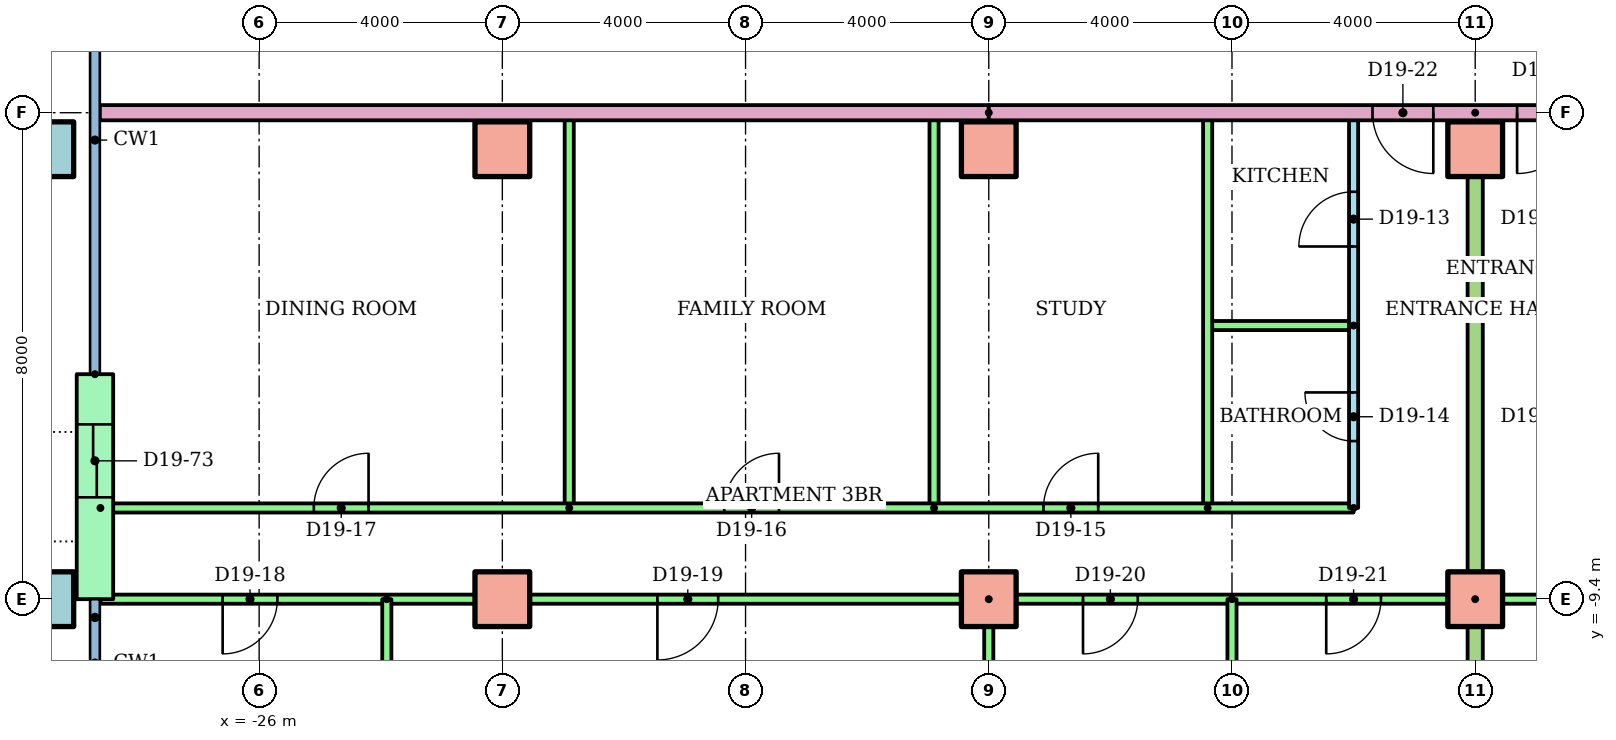
"""IFC4 building model, lengths in metres.
Left out: names, types, materials, properties, quantities, classifications, styles, units other than length and angle.
Written with IfcOpenShell. Run it as: python <this file> out.ifc"""

import sys

from ifc_helpers import new_model, si_unit, direction, frame, frame_2d, origin, origin_2d, place, context, subcontext, project, spatial, rectangle, hollow_rectangle, extrude, element, fill, save


model = new_model("IFC4")
c1 = context("Model", 3, precision=1e-05, world=origin(), true_north=direction((0.0, 1.0)))
c2 = subcontext(c1, "Body", "Model", "MODEL_VIEW")
j1 = project(units=[si_unit("LENGTHUNIT", "METRE"), si_unit("PLANEANGLEUNIT", "RADIAN")], contexts=[c1])
p1 = place(None, origin())
s1 = spatial("IfcSite", under=j1, at=p1, CompositionType="ELEMENT")
p2 = place(p1, origin())
s2 = spatial("IfcBuilding", under=s1, at=p2, CompositionType="ELEMENT")
p3 = place(p2, frame((0.0, 0.0, 77.5)))
s3 = spatial("IfcBuildingStorey", under=s2, at=p3, CompositionType="ELEMENT", Elevation=77.5)
p4 = place(p3, frame((-29.5, -9.4, 0.0)))
e1 = element("IfcColumn", 1, at=p4, inside=s3, PredefinedType="COLUMN", context=c2, shape_type="SweptSolid", body=[
    extrude(hollow_rectangle(XDim=0.9, YDim=0.9, WallThickness=0.045, at=origin_2d()), origin(), (0.0, 0.0, 1.0), 3.2),
])
for number, where in (
    (2, (-22.0, -9.4, 0.0)),
    (3, (-14.0, -9.4, 0.0)),
    (4, (-6.0, -9.4, 0.0)),
):
    element("IfcColumn", number, at=place(p3, frame(where)), inside=s3, PredefinedType="COLUMN", context=c2, shape_type="SweptSolid", body=[
        extrude(rectangle(XDim=0.9, YDim=0.9, at=origin_2d()), origin(), (0.0, 0.0, 1.0), 3.2),
    ])
p5 = place(p3, frame((-29.5, -2.0, 0.0)))
e5 = element("IfcColumn", 5, at=p5, inside=s3, PredefinedType="COLUMN", context=c2, shape_type="SweptSolid", body=[
    extrude(hollow_rectangle(XDim=0.9, YDim=0.9, WallThickness=0.045, at=origin_2d()), origin(), (0.0, 0.0, 1.0), 3.2),
])
for number, where in (
    (6, (-22.0, -2.0, 0.0)),
    (7, (-14.0, -2.0, 0.0)),
    (8, (-6.0, -2.0, 0.0)),
):
    element("IfcColumn", number, at=place(p3, frame(where)), inside=s3, PredefinedType="COLUMN", context=c2, shape_type="SweptSolid", body=[
        extrude(rectangle(XDim=0.9, YDim=0.9, at=origin_2d()), origin(), (0.0, 0.0, 1.0), 3.2),
    ])
p6 = place(p3, frame((-28.7, -5.7, 0.0), z_axis=(0.0, 0.0, 1.0), x_axis=(0.0, -1.0, 0.0)))
e9 = element("IfcWall", 9, at=p6, inside=s3, PredefinedType="STANDARD", context=c2, shape_type="SweptSolid", body=[
    extrude(rectangle(XDim=3.7, YDim=0.6, at=frame_2d((1.85, 0.0))), origin(), (0.0, 0.0, 1.0), 2.92),
])
p7 = place(p6, frame((0.825, 0.0, 0.0)))
e10 = element("IfcOpeningElement", 10, at=p7, cuts=e9, PredefinedType="OPENING", context=c2, shape_type="SweptSolid", body=[
    extrude(rectangle(XDim=1.2, YDim=2.1, at=frame_2d((0.6, 1.05))), frame((0.0, 0.31, 0.0), z_axis=(0.0, -1.0, 0.0), x_axis=(1.0, 0.0, 0.0)), (0.0, 0.0, 1.0), 0.62),
])
p8 = place(p3, frame((-8.0, -7.9, 0.0), z_axis=(0.0, 0.0, 1.0), x_axis=(0.0, 1.0, 0.0)))
e11 = element("IfcWall", 11, at=p8, inside=s3, PredefinedType="PARTITIONING", context=c2, shape_type="SweptSolid", body=[
    extrude(rectangle(XDim=6.5, YDim=0.15, at=frame_2d((3.25, 0.0))), origin(), (0.0, 0.0, 1.0), 2.4),
])
p9 = place(p8, frame((4.3, 0.0, 0.0)))
e12 = element("IfcOpeningElement", 12, at=p9, cuts=e11, PredefinedType="OPENING", context=c2, shape_type="SweptSolid", body=[
    extrude(rectangle(XDim=0.9, YDim=2.1, at=frame_2d((0.45, 1.05))), frame((0.0, 0.085, 0.0), z_axis=(0.0, -1.0, 0.0), x_axis=(1.0, 0.0, 0.0)), (0.0, 0.0, 1.0), 0.17),
])
p10 = place(p8, frame((1.1, 0.0, 0.0)))
e13 = element("IfcOpeningElement", 13, at=p10, cuts=e11, PredefinedType="OPENING", context=c2, shape_type="SweptSolid", body=[
    extrude(rectangle(XDim=0.8, YDim=2.1, at=frame_2d((0.4, 1.05))), frame((0.0, 0.085, 0.0), z_axis=(0.0, -1.0, 0.0), x_axis=(1.0, 0.0, 0.0)), (0.0, 0.0, 1.0), 0.17),
])
p11 = place(p3, frame((-8.0, -4.9, 0.0), z_axis=(0.0, 0.0, 1.0), x_axis=(-1.0, 0.0, 0.0)))
e14 = element("IfcWall", 14, at=p11, inside=s3, PredefinedType="PARTITIONING", context=c2, shape_type="SweptSolid", body=[
    extrude(rectangle(XDim=2.4, YDim=0.15, at=frame_2d((1.2, 0.0))), origin(), (0.0, 0.0, 1.0), 2.4),
])
for number, where, z_axis, x_axis in (
    (15, (-10.4, -7.9, 0.0), (0.0, 0.0, 1.0), (0.0, 1.0, 0.0)),
    (16, (-14.9, -7.9, 0.0), (0.0, 0.0, 1.0), (0.0, 1.0, 0.0)),
    (17, (-20.9, -7.9, 0.0), (0.0, 0.0, 1.0), (0.0, 1.0, 0.0)),
):
    element("IfcWall", number, at=place(p3, frame(where, z_axis=z_axis, x_axis=x_axis)), inside=s3, PredefinedType="PARTITIONING", context=c2, shape_type="SweptSolid", body=[
        extrude(rectangle(XDim=6.5, YDim=0.15, at=frame_2d((3.25, 0.0))), origin(), (0.0, 0.0, 1.0), 2.4),
    ])
p12 = place(p3, frame((-28.61, -7.9, 0.0)))
e18 = element("IfcWall", 18, at=p12, inside=s3, PredefinedType="PARTITIONING", context=c2, shape_type="SweptSolid", body=[
    extrude(rectangle(XDim=20.61, YDim=0.15, at=frame_2d((10.305, 0.0))), origin(), (0.0, 0.0, 1.0), 2.4),
])
p13 = place(p12, frame((15.51, 0.0, 0.0)))
e19 = element("IfcOpeningElement", 19, at=p13, cuts=e18, PredefinedType="OPENING", context=c2, shape_type="SweptSolid", body=[
    extrude(rectangle(XDim=0.9, YDim=2.1, at=frame_2d((0.45, 1.05))), frame((0.0, 0.085, 0.0), z_axis=(0.0, -1.0, 0.0), x_axis=(1.0, 0.0, 0.0)), (0.0, 0.0, 1.0), 0.17),
])
p14 = place(p12, frame((10.26, 0.0, 0.0)))
e20 = element("IfcOpeningElement", 20, at=p14, cuts=e18, PredefinedType="OPENING", context=c2, shape_type="SweptSolid", body=[
    extrude(rectangle(XDim=0.9, YDim=2.1, at=frame_2d((0.45, 1.05))), frame((0.0, 0.085, 0.0), z_axis=(0.0, -1.0, 0.0), x_axis=(1.0, 0.0, 0.0)), (0.0, 0.0, 1.0), 0.17),
])
p15 = place(p12, frame((3.51, 0.0, 0.0)))
e21 = element("IfcOpeningElement", 21, at=p15, cuts=e18, PredefinedType="OPENING", context=c2, shape_type="SweptSolid", body=[
    extrude(rectangle(XDim=0.9, YDim=2.1, at=frame_2d((0.45, 1.05))), frame((0.0, 0.085, 0.0), z_axis=(0.0, -1.0, 0.0), x_axis=(1.0, 0.0, 0.0)), (0.0, 0.0, 1.0), 0.17),
])
p16 = place(p3, frame((-6.0, -9.4, 0.0), z_axis=(0.0, 0.0, 1.0), x_axis=(-1.0, 0.0, 0.0)))
e22 = element("IfcWall", 22, at=p16, inside=s3, PredefinedType="PARTITIONING", context=c2, shape_type="SweptSolid", body=[
    extrude(rectangle(XDim=22.61, YDim=0.15, at=frame_2d((11.305, 0.0))), origin(), (0.0, 0.0, 1.0), 2.4),
])
p17 = place(p16, frame((19.7, 0.0, 0.0)))
e23 = element("IfcOpeningElement", 23, at=p17, cuts=e22, PredefinedType="OPENING", context=c2, shape_type="SweptSolid", body=[
    extrude(rectangle(XDim=0.9, YDim=2.1, at=frame_2d((0.45, 1.05))), frame((0.0, 0.085, 0.0), z_axis=(0.0, -1.0, 0.0), x_axis=(1.0, 0.0, 0.0)), (0.0, 0.0, 1.0), 0.17),
])
p18 = place(p16, frame((12.45, 0.0, 0.0)))
e24 = element("IfcOpeningElement", 24, at=p18, cuts=e22, PredefinedType="OPENING", context=c2, shape_type="SweptSolid", body=[
    extrude(rectangle(XDim=1.0, YDim=2.1, at=frame_2d((0.5, 1.05))), frame((0.0, 0.085, 0.0), z_axis=(0.0, -1.0, 0.0), x_axis=(1.0, 0.0, 0.0)), (0.0, 0.0, 1.0), 0.17),
])
p19 = place(p16, frame((5.55, 0.0, 0.0)))
e25 = element("IfcOpeningElement", 25, at=p19, cuts=e22, PredefinedType="OPENING", context=c2, shape_type="SweptSolid", body=[
    extrude(rectangle(XDim=0.9, YDim=2.1, at=frame_2d((0.45, 1.05))), frame((0.0, 0.085, 0.0), z_axis=(0.0, -1.0, 0.0), x_axis=(1.0, 0.0, 0.0)), (0.0, 0.0, 1.0), 0.17),
])
p20 = place(p16, frame((1.55, 0.0, 0.0)))
e26 = element("IfcOpeningElement", 26, at=p20, cuts=e22, PredefinedType="OPENING", context=c2, shape_type="SweptSolid", body=[
    extrude(rectangle(XDim=0.9, YDim=2.1, at=frame_2d((0.45, 1.05))), frame((0.0, 0.085, 0.0), z_axis=(0.0, -1.0, 0.0), x_axis=(1.0, 0.0, 0.0)), (0.0, 0.0, 1.0), 0.17),
])
p21 = place(p3, frame((-23.9, -9.4, 0.0), z_axis=(0.0, 0.0, 1.0), x_axis=(0.0, -1.0, 0.0)))
e27 = element("IfcWall", 27, at=p21, inside=s3, PredefinedType="PARTITIONING", context=c2, shape_type="SweptSolid", body=[
    extrude(rectangle(XDim=5.02, YDim=0.15, at=frame_2d((2.51, 0.0))), origin(), (0.0, 0.0, 1.0), 2.4),
])
p22 = place(p3, frame((-14.0, -9.4, 0.0), z_axis=(0.0, 0.0, 1.0), x_axis=(0.0, -1.0, 0.0)))
e28 = element("IfcWall", 28, at=p22, inside=s3, PredefinedType="PARTITIONING", context=c2, shape_type="SweptSolid", body=[
    extrude(rectangle(XDim=6.81, YDim=0.15, at=frame_2d((3.405, 0.0))), origin(), (0.0, 0.0, 1.0), 2.4),
])
p23 = place(p3, frame((-10.0, -9.4, 0.0), z_axis=(0.0, 0.0, 1.0), x_axis=(0.0, -1.0, 0.0)))
e29 = element("IfcWall", 29, at=p23, inside=s3, PredefinedType="PARTITIONING", context=c2, shape_type="SweptSolid", body=[
    extrude(rectangle(XDim=6.821, YDim=0.15, at=frame_2d((3.411, 0.0))), origin(), (0.0, 0.0, 1.0), 2.4),
])
p24 = place(p3, frame((10.0, -9.4, 0.0), z_axis=(0.0, 0.0, 1.0), x_axis=(-1.0, 0.0, 0.0)))
e30 = element("IfcWall", 30, at=p24, inside=s3, PredefinedType="PARTITIONING", context=c2, shape_type="SweptSolid", body=[
    extrude(rectangle(XDim=16.0, YDim=0.15, at=frame_2d((8.0, 0.0))), origin(), (0.0, 0.0, 1.0), 2.4),
])
p25 = place(p24, frame((13.55, 0.0, 0.0)))
e31 = element("IfcOpeningElement", 31, at=p25, cuts=e30, PredefinedType="OPENING", context=c2, shape_type="SweptSolid", body=[
    extrude(rectangle(XDim=0.9, YDim=2.1, at=frame_2d((0.45, 1.05))), frame((0.0, 0.085, 0.0), z_axis=(0.0, -1.0, 0.0), x_axis=(1.0, 0.0, 0.0)), (0.0, 0.0, 1.0), 0.17),
])
p26 = place(p24, frame((9.5, 0.0, 0.0)))
e32 = element("IfcOpeningElement", 32, at=p26, cuts=e30, PredefinedType="OPENING", context=c2, shape_type="SweptSolid", body=[
    extrude(rectangle(XDim=1.0, YDim=2.1, at=frame_2d((0.5, 1.05))), frame((0.0, 0.085, 0.0), z_axis=(0.0, -1.0, 0.0), x_axis=(1.0, 0.0, 0.0)), (0.0, 0.0, 1.0), 0.17),
])
p27 = place(p24, frame((5.55, 0.0, 0.0)))
e33 = element("IfcOpeningElement", 33, at=p27, cuts=e30, PredefinedType="OPENING", context=c2, shape_type="SweptSolid", body=[
    extrude(rectangle(XDim=0.9, YDim=2.1, at=frame_2d((0.45, 1.05))), frame((0.0, 0.085, 0.0), z_axis=(0.0, -1.0, 0.0), x_axis=(1.0, 0.0, 0.0)), (0.0, 0.0, 1.0), 0.17),
])
p28 = place(p24, frame((1.55, 0.0, 0.0)))
e34 = element("IfcOpeningElement", 34, at=p28, cuts=e30, PredefinedType="OPENING", context=c2, shape_type="SweptSolid", body=[
    extrude(rectangle(XDim=0.9, YDim=2.1, at=frame_2d((0.45, 1.05))), frame((0.0, 0.085, 0.0), z_axis=(0.0, -1.0, 0.0), x_axis=(1.0, 0.0, 0.0)), (0.0, 0.0, 1.0), 0.17),
])
p29 = place(p3, frame((-6.0, -1.4, 0.0), z_axis=(0.0, 0.0, 1.0), x_axis=(0.0, -1.0, 0.0)))
e35 = element("IfcWall", 35, at=p29, inside=s3, PredefinedType="PARTITIONING", context=c2, shape_type="SweptSolid", body=[
    extrude(rectangle(XDim=14.81, YDim=0.25, at=frame_2d((7.405, 0.0))), origin(), (0.0, 0.0, 1.0), 2.4),
])
p30 = place(p3, frame((-14.0, -1.4, 0.0), z_axis=(0.0, 0.0, 1.0), x_axis=(-1.0, 0.0, 0.0)))
e36 = element("IfcWall", 36, at=p30, inside=s3, PredefinedType="PARTITIONING", context=c2, shape_type="SweptSolid", body=[
    extrude(rectangle(XDim=14.62, YDim=0.25, at=frame_2d((7.31, 0.0))), origin(), (0.0, 0.0, 1.0), 2.4),
])
p31 = place(p3, frame((14.0, -1.4, 0.0), z_axis=(0.0, 0.0, 1.0), x_axis=(-1.0, 0.0, 0.0)))
e37 = element("IfcWall", 37, at=p31, inside=s3, PredefinedType="PARTITIONING", context=c2, shape_type="SweptSolid", body=[
    extrude(rectangle(XDim=28.0, YDim=0.25, at=frame_2d((14.0, 0.0))), origin(), (0.0, 0.0, 1.0), 2.4),
])
p32 = place(p31, frame((20.689, 0.0, 0.0)))
e38 = element("IfcOpeningElement", 38, at=p32, cuts=e37, PredefinedType="OPENING", context=c2, shape_type="SweptSolid", body=[
    extrude(rectangle(XDim=1.0, YDim=2.1, at=frame_2d((0.5, 1.05))), frame((0.0, 0.135, 0.0), z_axis=(0.0, -1.0, 0.0), x_axis=(1.0, 0.0, 0.0)), (0.0, 0.0, 1.0), 0.27),
])
p33 = place(p31, frame((18.311, 0.0, 0.0)))
e39 = element("IfcOpeningElement", 39, at=p33, cuts=e37, PredefinedType="OPENING", context=c2, shape_type="SweptSolid", body=[
    extrude(rectangle(XDim=1.0, YDim=2.1, at=frame_2d((0.5, 1.05))), frame((0.0, 0.135, 0.0), z_axis=(0.0, -1.0, 0.0), x_axis=(1.0, 0.0, 0.0)), (0.0, 0.0, 1.0), 0.27),
])
p34 = place(p31, frame((2.311, 0.0, 0.0)))
e40 = element("IfcOpeningElement", 40, at=p34, cuts=e37, PredefinedType="OPENING", context=c2, shape_type="SweptSolid", body=[
    extrude(rectangle(XDim=1.0, YDim=2.1, at=frame_2d((0.5, 1.05))), frame((0.0, 0.135, 0.0), z_axis=(0.0, -1.0, 0.0), x_axis=(1.0, 0.0, 0.0)), (0.0, 0.0, 1.0), 0.27),
])
p35 = place(p9, origin())
e41 = element("IfcDoor", 41, at=p35, inside=s3, OperationType="SINGLE_SWING_LEFT", PredefinedType="DOOR", context=c2, shape_type="SweptSolid", body=[
    extrude(rectangle(XDim=0.9, YDim=2.1, at=frame_2d((0.45, 1.05))), frame((0.0, 0.025, 0.0), z_axis=(0.0, -1.0, 0.0), x_axis=(1.0, 0.0, 0.0)), (0.0, 0.0, 1.0), 0.05),
])
fill(e12, e41)
p36 = place(p10, origin())
e42 = element("IfcDoor", 42, at=p36, inside=s3, OperationType="SINGLE_SWING_RIGHT", PredefinedType="DOOR", context=c2, shape_type="SweptSolid", body=[
    extrude(rectangle(XDim=0.8, YDim=2.1, at=frame_2d((0.4, 1.05))), frame((0.0, 0.025, 0.0), z_axis=(0.0, -1.0, 0.0), x_axis=(1.0, 0.0, 0.0)), (0.0, 0.0, 1.0), 0.05),
])
fill(e13, e42)
p37 = place(p13, origin())
e43 = element("IfcDoor", 43, at=p37, inside=s3, OperationType="SINGLE_SWING_RIGHT", PredefinedType="DOOR", context=c2, shape_type="SweptSolid", body=[
    extrude(rectangle(XDim=0.9, YDim=2.1, at=frame_2d((0.45, 1.05))), frame((0.0, 0.025, 0.0), z_axis=(0.0, -1.0, 0.0), x_axis=(1.0, 0.0, 0.0)), (0.0, 0.0, 1.0), 0.05),
])
fill(e19, e43)
p38 = place(p14, origin())
e44 = element("IfcDoor", 44, at=p38, inside=s3, OperationType="SINGLE_SWING_RIGHT", PredefinedType="DOOR", context=c2, shape_type="SweptSolid", body=[
    extrude(rectangle(XDim=0.9, YDim=2.1, at=frame_2d((0.45, 1.05))), frame((0.0, 0.025, 0.0), z_axis=(0.0, -1.0, 0.0), x_axis=(1.0, 0.0, 0.0)), (0.0, 0.0, 1.0), 0.05),
])
fill(e20, e44)
p39 = place(p15, origin())
e45 = element("IfcDoor", 45, at=p39, inside=s3, OperationType="SINGLE_SWING_RIGHT", PredefinedType="DOOR", context=c2, shape_type="SweptSolid", body=[
    extrude(rectangle(XDim=0.9, YDim=2.1, at=frame_2d((0.45, 1.05))), frame((0.0, 0.025, 0.0), z_axis=(0.0, -1.0, 0.0), x_axis=(1.0, 0.0, 0.0)), (0.0, 0.0, 1.0), 0.05),
])
fill(e21, e45)
p40 = place(p17, origin())
e46 = element("IfcDoor", 46, at=p40, inside=s3, OperationType="SINGLE_SWING_RIGHT", PredefinedType="DOOR", context=c2, shape_type="SweptSolid", body=[
    extrude(rectangle(XDim=0.9, YDim=2.1, at=frame_2d((0.45, 1.05))), frame((0.0, 0.025, 0.0), z_axis=(0.0, -1.0, 0.0), x_axis=(1.0, 0.0, 0.0)), (0.0, 0.0, 1.0), 0.05),
])
fill(e23, e46)
p41 = place(p18, origin())
e47 = element("IfcDoor", 47, at=p41, inside=s3, OperationType="SINGLE_SWING_RIGHT", PredefinedType="DOOR", context=c2, shape_type="SweptSolid", body=[
    extrude(rectangle(XDim=1.0, YDim=2.1, at=frame_2d((0.5, 1.05))), frame((0.0, 0.025, 0.0), z_axis=(0.0, -1.0, 0.0), x_axis=(1.0, 0.0, 0.0)), (0.0, 0.0, 1.0), 0.05),
])
fill(e24, e47)
p42 = place(p19, origin())
e48 = element("IfcDoor", 48, at=p42, inside=s3, OperationType="SINGLE_SWING_RIGHT", PredefinedType="DOOR", context=c2, shape_type="SweptSolid", body=[
    extrude(rectangle(XDim=0.9, YDim=2.1, at=frame_2d((0.45, 1.05))), frame((0.0, 0.025, 0.0), z_axis=(0.0, -1.0, 0.0), x_axis=(1.0, 0.0, 0.0)), (0.0, 0.0, 1.0), 0.05),
])
fill(e25, e48)
p43 = place(p20, origin())
e49 = element("IfcDoor", 49, at=p43, inside=s3, OperationType="SINGLE_SWING_RIGHT", PredefinedType="DOOR", context=c2, shape_type="SweptSolid", body=[
    extrude(rectangle(XDim=0.9, YDim=2.1, at=frame_2d((0.45, 1.05))), frame((0.0, 0.025, 0.0), z_axis=(0.0, -1.0, 0.0), x_axis=(1.0, 0.0, 0.0)), (0.0, 0.0, 1.0), 0.05),
])
fill(e26, e49)
p44 = place(p32, origin())
e50 = element("IfcDoor", 50, at=p44, inside=s3, OperationType="SINGLE_SWING_LEFT", PredefinedType="DOOR", context=c2, shape_type="SweptSolid", body=[
    extrude(rectangle(XDim=1.0, YDim=2.1, at=frame_2d((0.5, 1.05))), frame((0.0, 0.025, 0.0), z_axis=(0.0, -1.0, 0.0), x_axis=(1.0, 0.0, 0.0)), (0.0, 0.0, 1.0), 0.05),
])
fill(e38, e50)
p45 = place(p33, origin())
e51 = element("IfcDoor", 51, at=p45, inside=s3, OperationType="SINGLE_SWING_RIGHT", PredefinedType="DOOR", context=c2, shape_type="SweptSolid", body=[
    extrude(rectangle(XDim=1.0, YDim=2.1, at=frame_2d((0.5, 1.05))), frame((0.0, 0.025, 0.0), z_axis=(0.0, -1.0, 0.0), x_axis=(1.0, 0.0, 0.0)), (0.0, 0.0, 1.0), 0.05),
])
fill(e39, e51)
p46 = place(p7, origin())
e52 = element("IfcDoor", 52, at=p46, inside=s3, OperationType="SLIDING_TO_LEFT", PredefinedType="DOOR", context=c2, shape_type="SweptSolid", body=[
    extrude(rectangle(XDim=1.2, YDim=2.1, at=frame_2d((0.6, 1.05))), frame((0.0, 0.025, 0.0), z_axis=(0.0, -1.0, 0.0), x_axis=(1.0, 0.0, 0.0)), (0.0, 0.0, 1.0), 0.05),
])
fill(e10, e52)
save(model, sys.argv[1])
